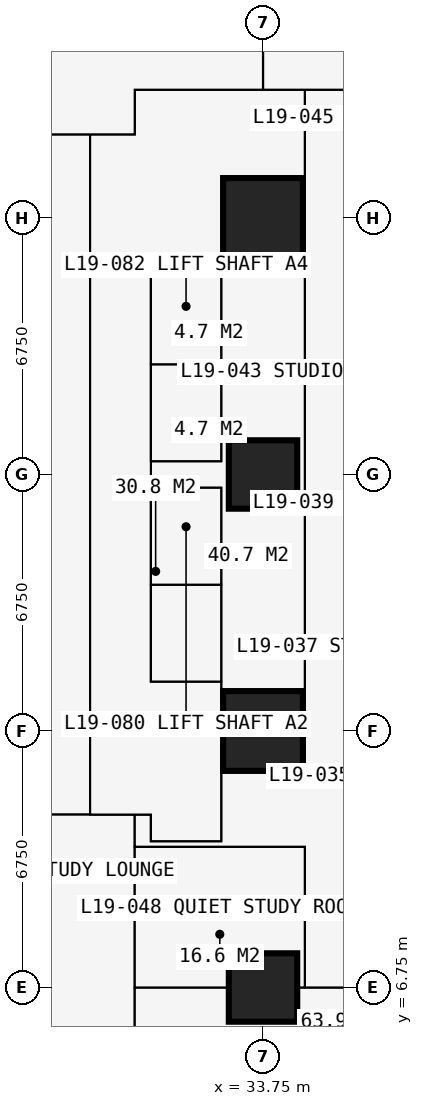
"""IFC4 building model, lengths in metres.
Left out: names, types, materials, properties, quantities, classifications, styles, units other than length and angle.
Written with IfcOpenShell. Run it as: python <this file> out.ifc"""

import sys

from ifc_helpers import new_model, si_unit, direction, frame, frame_2d, origin, origin_2d, place, context, subcontext, project, spatial, rectangle, extrude, element, fill, save


model = new_model("IFC4")
c1 = context("Model", 3, precision=1e-05, world=origin(), true_north=direction((0.0, 1.0)))
c2 = subcontext(c1, "Body", "Model", "MODEL_VIEW")
j1 = project(units=[si_unit("LENGTHUNIT", "METRE"), si_unit("PLANEANGLEUNIT", "RADIAN")], contexts=[c1])
p1 = place(None, origin())
s1 = spatial("IfcSite", under=j1, at=p1, CompositionType="ELEMENT")
p2 = place(p1, origin())
s2 = spatial("IfcBuilding", under=s1, at=p2, CompositionType="ELEMENT")
p3 = place(p2, frame((0.0, 0.0, 72.0)))
s3 = spatial("IfcBuildingStorey", under=s2, at=p3, CompositionType="ELEMENT", Elevation=72.0)
p4 = place(p3, frame((33.75, 6.75, 0.0), z_axis=(0.0, 0.0, 1.0), x_axis=(1.0, 0.0, 0.0)))
e1 = element("IfcColumn", 1, at=p4, inside=s3, PredefinedType="COLUMN", context=c2, shape_type="SweptSolid", body=[
    extrude(rectangle(XDim=1.8, YDim=1.8, at=origin_2d()), origin(), (0.0, 0.0, 1.0), 3.6),
])
p5 = place(p3, frame((33.75, 13.5, 0.0), z_axis=(0.0, 0.0, 1.0), x_axis=(1.0, 0.0, 0.0)))
e2 = element("IfcColumn", 2, at=p5, inside=s3, PredefinedType="COLUMN", context=c2, shape_type="SweptSolid", body=[
    extrude(rectangle(XDim=2.1, YDim=2.1, at=origin_2d()), origin(), (0.0, 0.0, 1.0), 3.6),
])
p6 = place(p3, frame((33.75, 20.25, 0.0), z_axis=(0.0, 0.0, 1.0), x_axis=(1.0, 0.0, 0.0)))
e3 = element("IfcColumn", 3, at=p6, inside=s3, PredefinedType="COLUMN", context=c2, shape_type="SweptSolid", body=[
    extrude(rectangle(XDim=1.8, YDim=1.8, at=origin_2d()), origin(), (0.0, 0.0, 1.0), 3.6),
])
p7 = place(p3, frame((33.75, 27.0, 0.0), z_axis=(0.0, 0.0, 1.0), x_axis=(1.0, 0.0, 0.0)))
e4 = element("IfcColumn", 4, at=p7, inside=s3, PredefinedType="COLUMN", context=c2, shape_type="SweptSolid", body=[
    extrude(rectangle(XDim=2.1, YDim=2.1, at=origin_2d()), origin(), (0.0, 0.0, 1.0), 3.6),
])
p8 = place(p3, frame((10.125, 11.3, 0.0), z_axis=(0.0, 0.0, 1.0), x_axis=(1.0, 0.0, 0.0)))
e5 = element("IfcWall", 5, at=p8, inside=s3, PredefinedType="PARTITIONING", context=c2, shape_type="SweptSolid", body=[
    extrude(rectangle(XDim=20.675, YDim=0.15, at=frame_2d((10.337, 0.0))), origin(), (0.0, 0.0, 1.0), 3.3),
])
p9 = place(p8, frame((1.775, 0.0, 0.0)))
e6 = element("IfcOpeningElement", 6, at=p9, cuts=e5, PredefinedType="OPENING", context=c2, shape_type="SweptSolid", body=[
    extrude(rectangle(XDim=1.0, YDim=2.2, at=frame_2d((0.5, 1.1))), frame((0.0, 0.085, 0.0), z_axis=(0.0, -1.0, 0.0), x_axis=(1.0, 0.0, 0.0)), (0.0, 0.0, 1.0), 0.17),
])
p10 = place(p8, frame((11.312, 0.0, 0.0)))
e7 = element("IfcOpeningElement", 7, at=p10, cuts=e5, PredefinedType="OPENING", context=c2, shape_type="SweptSolid", body=[
    extrude(rectangle(XDim=1.0, YDim=2.2, at=frame_2d((0.5, 1.1))), frame((0.0, 0.085, 0.0), z_axis=(0.0, -1.0, 0.0), x_axis=(1.0, 0.0, 0.0)), (0.0, 0.0, 1.0), 0.17),
])
p11 = place(p3, frame((11.3, 29.2, 0.0), z_axis=(0.0, 0.0, 1.0), x_axis=(1.0, 0.0, 0.0)))
e8 = element("IfcWall", 8, at=p11, inside=s3, PredefinedType="PARTITIONING", context=c2, shape_type="SweptSolid", body=[
    extrude(rectangle(XDim=19.075, YDim=0.15, at=frame_2d((9.538, 0.0))), origin(), (0.0, 0.0, 1.0), 3.3),
])
p12 = place(p11, frame((12.875, 0.0, 0.0)))
e9 = element("IfcOpeningElement", 9, at=p12, cuts=e8, PredefinedType="OPENING", context=c2, shape_type="SweptSolid", body=[
    extrude(rectangle(XDim=1.0, YDim=2.2, at=frame_2d((0.5, 1.1))), frame((0.0, 0.085, 0.0), z_axis=(0.0, -1.0, 0.0), x_axis=(1.0, 0.0, 0.0)), (0.0, 0.0, 1.0), 0.17),
])
p13 = place(p11, frame((10.438, 0.0, 0.0)))
e10 = element("IfcOpeningElement", 10, at=p13, cuts=e8, PredefinedType="OPENING", context=c2, shape_type="SweptSolid", body=[
    extrude(rectangle(XDim=1.0, YDim=2.2, at=frame_2d((0.5, 1.1))), frame((0.0, 0.085, 0.0), z_axis=(0.0, -1.0, 0.0), x_axis=(1.0, 0.0, 0.0)), (0.0, 0.0, 1.0), 0.17),
])
p14 = place(p11, frame((15.675, 0.0, 0.0)))
e11 = element("IfcOpeningElement", 11, at=p14, cuts=e8, PredefinedType="OPENING", context=c2, shape_type="SweptSolid", body=[
    extrude(rectangle(XDim=0.95, YDim=2.2, at=frame_2d((0.475, 1.1))), frame((0.0, 0.085, 0.0), z_axis=(0.0, -1.0, 0.0), x_axis=(1.0, 0.0, 0.0)), (0.0, 0.0, 1.0), 0.17),
])
p15 = place(p3, frame((29.2, 11.3, 0.0), z_axis=(0.0, 0.0, 1.0), x_axis=(0.0, 1.0, 0.0)))
e12 = element("IfcWall", 12, at=p15, inside=s3, PredefinedType="PARTITIONING", context=c2, shape_type="SweptSolid", body=[
    extrude(rectangle(XDim=17.9, YDim=0.2, at=frame_2d((8.95, 0.0))), origin(), (0.0, 0.0, 1.0), 3.3),
])
p16 = place(p15, frame((8.35, 0.0, 0.0)))
e13 = element("IfcOpeningElement", 13, at=p16, cuts=e12, PredefinedType="OPENING", context=c2, shape_type="SweptSolid", body=[
    extrude(rectangle(XDim=1.2, YDim=2.2, at=frame_2d((0.6, 1.1))), frame((0.0, 0.11, 0.0), z_axis=(0.0, -1.0, 0.0), x_axis=(1.0, 0.0, 0.0)), (0.0, 0.0, 1.0), 0.22),
])
p17 = place(p3, frame((29.2, 25.7, 0.0), z_axis=(0.0, 0.0, 1.0), x_axis=(1.0, 0.0, 0.0)))
e14 = element("IfcWall", 14, at=p17, inside=s3, PredefinedType="SHEAR", context=c2, shape_type="SweptSolid", body=[
    extrude(rectangle(XDim=3.45, YDim=0.1, at=frame_2d((1.725, 0.0))), origin(), (0.0, 0.0, 1.0), 3.3),
])
p18 = place(p3, frame((30.375, -0.734, 0.0), z_axis=(0.0, 0.0, 1.0), x_axis=(0.0, 1.0, 0.0)))
e15 = element("IfcWall", 15, at=p18, inside=s3, PredefinedType="PARTITIONING", context=c2, shape_type="SweptSolid", body=[
    extrude(rectangle(XDim=12.034, YDim=0.15, at=frame_2d((6.017, 0.0))), origin(), (0.0, 0.0, 1.0), 3.3),
])
p19 = place(p18, frame((5.134, 0.0, 0.0)))
e16 = element("IfcOpeningElement", 16, at=p19, cuts=e15, PredefinedType="OPENING", context=c2, shape_type="SweptSolid", body=[
    extrude(rectangle(XDim=1.0, YDim=2.2, at=frame_2d((0.5, 1.1))), frame((0.0, 0.085, 0.0), z_axis=(0.0, -1.0, 0.0), x_axis=(1.0, 0.0, 0.0)), (0.0, 0.0, 1.0), 0.17),
])
p20 = place(p3, frame((30.375, 6.75, 0.0), z_axis=(0.0, 0.0, 1.0), x_axis=(1.0, 0.0, 0.0)))
e17 = element("IfcWall", 17, at=p20, inside=s3, PredefinedType="PARTITIONING", context=c2, shape_type="SweptSolid", body=[
    extrude(rectangle(XDim=5.975, YDim=0.15, at=frame_2d((2.988, 0.0))), origin(), (0.0, 0.0, 1.0), 2.802),
])
p21 = place(p3, frame((30.375, 10.45, 0.0), z_axis=(0.0, 0.0, 1.0), x_axis=(1.0, 0.0, 0.0)))
e18 = element("IfcWall", 18, at=p21, inside=s3, PredefinedType="PARTITIONING", context=c2, shape_type="SweptSolid", body=[
    extrude(rectangle(XDim=4.475, YDim=0.15, at=frame_2d((2.238, 0.0))), origin(), (0.0, 0.0, 1.0), 3.3),
])
p22 = place(p21, frame((2.35, 0.0, 0.0)))
e19 = element("IfcOpeningElement", 19, at=p22, cuts=e18, PredefinedType="OPENING", context=c2, shape_type="SweptSolid", body=[
    extrude(rectangle(XDim=0.95, YDim=2.2, at=frame_2d((0.475, 1.1))), frame((0.0, 0.085, 0.0), z_axis=(0.0, -1.0, 0.0), x_axis=(1.0, 0.0, 0.0)), (0.0, 0.0, 1.0), 0.17),
])
p23 = place(p3, frame((30.375, 29.2, 0.0), z_axis=(0.0, 0.0, 1.0), x_axis=(0.0, 1.0, 0.0)))
e20 = element("IfcWall", 20, at=p23, inside=s3, PredefinedType="PARTITIONING", context=c2, shape_type="SweptSolid", body=[
    extrude(rectangle(XDim=1.175, YDim=0.15, at=frame_2d((0.587, 0.0))), origin(), (0.0, 0.0, 1.0), 3.3),
])
p24 = place(p3, frame((30.375, 30.375, 0.0), z_axis=(0.0, 0.0, 1.0), x_axis=(1.0, 0.0, 0.0)))
e21 = element("IfcWall", 21, at=p24, inside=s3, PredefinedType="PARTITIONING", context=c2, shape_type="SweptSolid", body=[
    extrude(rectangle(XDim=10.859, YDim=0.15, at=frame_2d((5.429, 0.0))), origin(), (0.0, 0.0, 1.0), 3.3),
])
p25 = place(p3, frame((30.8, 10.6, 0.0), z_axis=(0.0, 0.0, 1.0), x_axis=(0.0, 1.0, 0.0)))
e22 = element("IfcWall", 22, at=p25, inside=s3, PredefinedType="PARTITIONING", context=c2, shape_type="SweptSolid", body=[
    extrude(rectangle(XDim=0.7, YDim=0.15, at=frame_2d((0.35, 0.0))), origin(), (0.0, 0.0, 1.0), 3.3),
])
p26 = place(p3, frame((30.8, 10.6, 0.0), z_axis=(0.0, 0.0, 1.0), x_axis=(1.0, 0.0, 0.0)))
e23 = element("IfcWall", 23, at=p26, inside=s3, PredefinedType="PARTITIONING", context=c2, shape_type="SweptSolid", body=[
    extrude(rectangle(XDim=1.85, YDim=0.15, at=frame_2d((0.925, 0.0))), origin(), (0.0, 0.0, 1.0), 3.3),
])
p27 = place(p3, frame((30.8, 14.8, 0.0), z_axis=(0.0, 0.0, 1.0), x_axis=(0.0, 1.0, 0.0)))
e24 = element("IfcWall", 24, at=p27, inside=s3, PredefinedType="PARTITIONING", context=c2, shape_type="SweptSolid", body=[
    extrude(rectangle(XDim=10.9, YDim=0.15, at=frame_2d((5.45, 0.0))), origin(), (0.0, 0.0, 1.0), 3.3),
])
p28 = place(p27, frame((0.75, 0.0, 0.0)))
e25 = element("IfcOpeningElement", 25, at=p28, cuts=e24, PredefinedType="OPENING", context=c2, shape_type="SweptSolid", body=[
    extrude(rectangle(XDim=1.1, YDim=2.2, at=frame_2d((0.55, 1.1))), frame((0.0, 0.085, 0.0), z_axis=(0.0, -1.0, 0.0), x_axis=(1.0, 0.0, 0.0)), (0.0, 0.0, 1.0), 0.17),
])
p29 = place(p27, frame((3.25, 0.0, 0.0)))
e26 = element("IfcOpeningElement", 26, at=p29, cuts=e24, PredefinedType="OPENING", context=c2, shape_type="SweptSolid", body=[
    extrude(rectangle(XDim=1.1, YDim=2.2, at=frame_2d((0.55, 1.1))), frame((0.0, 0.085, 0.0), z_axis=(0.0, -1.0, 0.0), x_axis=(1.0, 0.0, 0.0)), (0.0, 0.0, 1.0), 0.17),
])
p30 = place(p27, frame((6.5, 0.0, 0.0)))
e27 = element("IfcOpeningElement", 27, at=p30, cuts=e24, PredefinedType="OPENING", context=c2, shape_type="SweptSolid", body=[
    extrude(rectangle(XDim=1.1, YDim=2.2, at=frame_2d((0.55, 1.1))), frame((0.0, 0.085, 0.0), z_axis=(0.0, -1.0, 0.0), x_axis=(1.0, 0.0, 0.0)), (0.0, 0.0, 1.0), 0.17),
])
p31 = place(p27, frame((9.05, 0.0, 0.0)))
e28 = element("IfcOpeningElement", 28, at=p31, cuts=e24, PredefinedType="OPENING", context=c2, shape_type="SweptSolid", body=[
    extrude(rectangle(XDim=1.1, YDim=2.2, at=frame_2d((0.55, 1.1))), frame((0.0, 0.085, 0.0), z_axis=(0.0, -1.0, 0.0), x_axis=(1.0, 0.0, 0.0)), (0.0, 0.0, 1.0), 0.17),
])
for number, where, z_axis, x_axis in (
    (29, (30.8, 14.8, 0.0), (0.0, 0.0, 1.0), (1.0, 0.0, 0.0)),
    (30, (30.8, 17.35, 0.0), (0.0, 0.0, 1.0), (1.0, 0.0, 0.0)),
    (31, (30.8, 19.9, 0.0), (0.0, 0.0, 1.0), (1.0, 0.0, 0.0)),
    (32, (30.8, 20.6, 0.0), (0.0, 0.0, 1.0), (1.0, 0.0, 0.0)),
    (33, (30.8, 23.15, 0.0), (0.0, 0.0, 1.0), (1.0, 0.0, 0.0)),
):
    element("IfcWall", number, at=place(p3, frame(where, z_axis=z_axis, x_axis=x_axis)), inside=s3, PredefinedType="SHEAR", context=c2, shape_type="SweptSolid", body=[
        extrude(rectangle(XDim=1.85, YDim=0.1, at=frame_2d((0.925, 0.0))), origin(), (0.0, 0.0, 1.0), 3.3),
    ])
p32 = place(p3, frame((32.65, 10.6, 0.0), z_axis=(0.0, 0.0, 1.0), x_axis=(0.0, 1.0, 0.0)))
e34 = element("IfcWall", 34, at=p32, inside=s3, PredefinedType="SHEAR", context=c2, shape_type="SweptSolid", body=[
    extrude(rectangle(XDim=9.3, YDim=0.1, at=frame_2d((4.65, 0.0))), origin(), (0.0, 0.0, 1.0), 3.3),
])
p33 = place(p32, frame((0.5, 0.0, 0.0)))
e35 = element("IfcOpeningElement", 35, at=p33, cuts=e34, PredefinedType="OPENING", context=c2, shape_type="SweptSolid", body=[
    extrude(rectangle(XDim=1.0, YDim=2.2, at=frame_2d((0.5, 1.1))), frame((0.0, 0.06, 0.0), z_axis=(0.0, -1.0, 0.0), x_axis=(1.0, 0.0, 0.0)), (0.0, 0.0, 1.0), 0.12),
])
p34 = place(p3, frame((32.65, 12.55, 0.0), z_axis=(0.0, 0.0, 1.0), x_axis=(1.0, 0.0, 0.0)))
e36 = element("IfcWall", 36, at=p34, inside=s3, PredefinedType="PARTITIONING", context=c2, shape_type="SweptSolid", body=[
    extrude(rectangle(XDim=2.2, YDim=0.15, at=frame_2d((1.1, 0.0))), origin(), (0.0, 0.0, 1.0), 3.3),
])
p35 = place(p3, frame((32.65, 20.6, 0.0), z_axis=(0.0, 0.0, 1.0), x_axis=(0.0, 1.0, 0.0)))
e37 = element("IfcWall", 37, at=p35, inside=s3, PredefinedType="PARTITIONING", context=c2, shape_type="SweptSolid", body=[
    extrude(rectangle(XDim=5.1, YDim=0.15, at=frame_2d((2.55, 0.0))), origin(), (0.0, 0.0, 1.0), 3.3),
])
p36 = place(p3, frame((33.75, 30.375, 0.0), z_axis=(0.0, 0.0, 1.0), x_axis=(0.0, 1.0, 0.0)))
e38 = element("IfcWall", 38, at=p36, inside=s3, PredefinedType="PARTITIONING", context=c2, shape_type="SweptSolid", body=[
    extrude(rectangle(XDim=5.975, YDim=0.15, at=frame_2d((2.988, 0.0))), origin(), (0.0, 0.0, 1.0), 2.802),
])
p37 = place(p3, frame((34.85, 6.75, 0.0), z_axis=(0.0, 0.0, 1.0), x_axis=(0.0, 1.0, 0.0)))
e39 = element("IfcWall", 39, at=p37, inside=s3, PredefinedType="PARTITIONING", context=c2, shape_type="SweptSolid", body=[
    extrude(rectangle(XDim=3.7, YDim=0.15, at=frame_2d((1.85, 0.0))), origin(), (0.0, 0.0, 1.0), 3.3),
])
p38 = place(p3, frame((34.85, 12.55, 0.0), z_axis=(0.0, 0.0, 1.0), x_axis=(0.0, 1.0, 0.0)))
e40 = element("IfcWall", 40, at=p38, inside=s3, PredefinedType="PARTITIONING", context=c2, shape_type="SweptSolid", body=[
    extrude(rectangle(XDim=17.825, YDim=0.15, at=frame_2d((8.913, 0.0))), origin(), (0.0, 0.0, 1.0), 3.3),
])
p39 = place(p38, frame((8.6, 0.0, 0.0)))
e41 = element("IfcOpeningElement", 41, at=p39, cuts=e40, PredefinedType="OPENING", context=c2, shape_type="SweptSolid", body=[
    extrude(rectangle(XDim=0.95, YDim=2.2, at=frame_2d((0.475, 1.1))), frame((0.0, 0.085, 0.0), z_axis=(0.0, -1.0, 0.0), x_axis=(1.0, 0.0, 0.0)), (0.0, 0.0, 1.0), 0.17),
])
p40 = place(p33, origin())
e42 = element("IfcDoor", 42, at=p40, inside=s3, OperationType="SINGLE_SWING_LEFT", PredefinedType="DOOR", context=c2, shape_type="SweptSolid", body=[
    extrude(rectangle(XDim=1.0, YDim=2.2, at=frame_2d((0.5, 1.1))), frame((0.0, 0.025, 0.0), z_axis=(0.0, -1.0, 0.0), x_axis=(1.0, 0.0, 0.0)), (0.0, 0.0, 1.0), 0.05),
])
fill(e35, e42)
p41 = place(p39, origin())
e43 = element("IfcDoor", 43, at=p41, inside=s3, OperationType="SINGLE_SWING_LEFT", PredefinedType="DOOR", context=c2, shape_type="SweptSolid", body=[
    extrude(rectangle(XDim=0.95, YDim=2.2, at=frame_2d((0.475, 1.1))), frame((0.0, 0.025, 0.0), z_axis=(0.0, -1.0, 0.0), x_axis=(1.0, 0.0, 0.0)), (0.0, 0.0, 1.0), 0.05),
])
fill(e41, e43)
p42 = place(p22, origin())
e44 = element("IfcDoor", 44, at=p42, inside=s3, OperationType="SINGLE_SWING_LEFT", PredefinedType="DOOR", context=c2, shape_type="SweptSolid", body=[
    extrude(rectangle(XDim=0.95, YDim=2.2, at=frame_2d((0.475, 1.1))), frame((0.0, 0.025, 0.0), z_axis=(0.0, -1.0, 0.0), x_axis=(1.0, 0.0, 0.0)), (0.0, 0.0, 1.0), 0.05),
])
fill(e19, e44)
p43 = place(p28, origin())
e45 = element("IfcDoor", 45, at=p43, inside=s3, OperationType="DOUBLE_DOOR_SLIDING", PredefinedType="DOOR", context=c2, shape_type="SweptSolid", body=[
    extrude(rectangle(XDim=1.1, YDim=2.2, at=frame_2d((0.55, 1.1))), frame((0.0, 0.025, 0.0), z_axis=(0.0, -1.0, 0.0), x_axis=(1.0, 0.0, 0.0)), (0.0, 0.0, 1.0), 0.05),
])
fill(e25, e45)
p44 = place(p29, origin())
e46 = element("IfcDoor", 46, at=p44, inside=s3, OperationType="DOUBLE_DOOR_SLIDING", PredefinedType="DOOR", context=c2, shape_type="SweptSolid", body=[
    extrude(rectangle(XDim=1.1, YDim=2.2, at=frame_2d((0.55, 1.1))), frame((0.0, 0.025, 0.0), z_axis=(0.0, -1.0, 0.0), x_axis=(1.0, 0.0, 0.0)), (0.0, 0.0, 1.0), 0.05),
])
fill(e26, e46)
p45 = place(p30, origin())
e47 = element("IfcDoor", 47, at=p45, inside=s3, OperationType="DOUBLE_DOOR_SLIDING", PredefinedType="DOOR", context=c2, shape_type="SweptSolid", body=[
    extrude(rectangle(XDim=1.1, YDim=2.2, at=frame_2d((0.55, 1.1))), frame((0.0, 0.025, 0.0), z_axis=(0.0, -1.0, 0.0), x_axis=(1.0, 0.0, 0.0)), (0.0, 0.0, 1.0), 0.05),
])
fill(e27, e47)
p46 = place(p31, origin())
e48 = element("IfcDoor", 48, at=p46, inside=s3, OperationType="DOUBLE_DOOR_SLIDING", PredefinedType="DOOR", context=c2, shape_type="SweptSolid", body=[
    extrude(rectangle(XDim=1.1, YDim=2.2, at=frame_2d((0.55, 1.1))), frame((0.0, 0.025, 0.0), z_axis=(0.0, -1.0, 0.0), x_axis=(1.0, 0.0, 0.0)), (0.0, 0.0, 1.0), 0.05),
])
fill(e28, e48)
p47 = place(p16, origin())
e49 = element("IfcDoor", 49, at=p47, inside=s3, OperationType="DOUBLE_DOOR_SINGLE_SWING", PredefinedType="DOOR", context=c2, shape_type="SweptSolid", body=[
    extrude(rectangle(XDim=1.2, YDim=2.2, at=frame_2d((0.6, 1.1))), frame((0.0, 0.025, 0.0), z_axis=(0.0, -1.0, 0.0), x_axis=(1.0, 0.0, 0.0)), (0.0, 0.0, 1.0), 0.05),
])
fill(e13, e49)
save(model, sys.argv[1])
